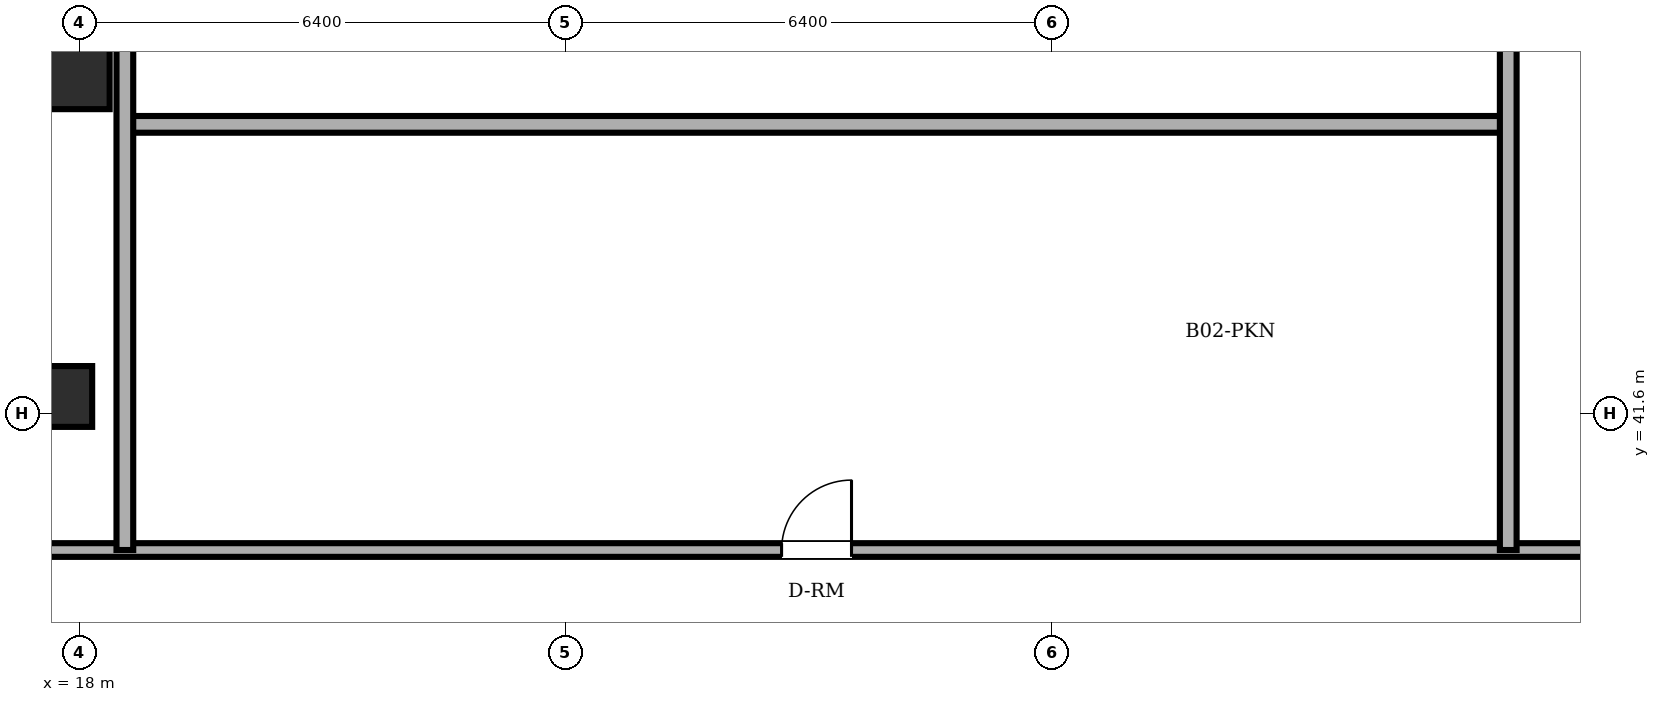
"""IFC4 building model, lengths in metres.
Left out: names, types, materials, properties, quantities, classifications, styles, units other than length and angle.
Written with IfcOpenShell. Run it as: python <this file> out.ifc"""

import sys

from ifc_helpers import new_model, si_unit, direction, frame, frame_2d, origin, origin_2d, place, context, subcontext, project, spatial, rectangle, extrude, element, fill, save


model = new_model("IFC4")
c1 = context("Model", 3, precision=1e-05, world=origin(), true_north=direction((0.0, 1.0)))
c2 = subcontext(c1, "Body", "Model", "MODEL_VIEW")
j1 = project(units=[si_unit("LENGTHUNIT", "METRE"), si_unit("PLANEANGLEUNIT", "RADIAN")], contexts=[c1])
p1 = place(None, origin())
s1 = spatial("IfcSite", under=j1, at=p1, CompositionType="ELEMENT")
p2 = place(p1, origin())
s2 = spatial("IfcBuilding", under=s1, at=p2, CompositionType="ELEMENT")
p3 = place(p2, frame((0.0, 0.0, -8.4)))
s3 = spatial("IfcBuildingStorey", under=s2, at=p3, CompositionType="ELEMENT", Elevation=-8.4)
for number, where, z_axis, x_axis in (
    (1, (18.0, 46.0, 0.0), (0.0, 0.0, 1.0), (1.0, 0.0, 0.0)),
    (2, (17.77, 41.82, 0.0), (0.0, 0.0, 1.0), (1.0, 0.0, 0.0)),
):
    element("IfcColumn", number, at=place(p3, frame(where, z_axis=z_axis, x_axis=x_axis)), inside=s3, PredefinedType="COLUMN", context=c2, shape_type="SweptSolid", body=[
        extrude(rectangle(XDim=0.8, YDim=0.8, at=origin_2d()), origin(), (0.0, 0.0, 1.0), 4.2),
    ])
p4 = place(p3, frame((8.5, 39.8, 0.0), z_axis=(0.0, 0.0, 1.0), x_axis=(1.0, 0.0, 0.0)))
e3 = element("IfcWall", 3, at=p4, inside=s3, PredefinedType="PARTITIONING", context=c2, shape_type="SweptSolid", body=[
    extrude(rectangle(XDim=49.9, YDim=0.18, at=frame_2d((24.95, 0.0))), origin(), (0.0, 0.0, 1.0), 3.95),
])
p5 = place(p4, frame((18.74, 0.0, 0.0)))
e4 = element("IfcOpeningElement", 4, at=p5, cuts=e3, PredefinedType="OPENING", context=c2, shape_type="SweptSolid", body=[
    extrude(rectangle(XDim=0.92, YDim=2.1, at=frame_2d((0.46, 1.05))), frame((0.0, 0.1, 0.0), z_axis=(0.0, -1.0, 0.0), x_axis=(1.0, 0.0, 0.0)), (0.0, 0.0, 1.0), 0.2),
])
p6 = place(p3, frame((18.6, 45.4, 0.0), z_axis=(0.0, 0.0, 1.0), x_axis=(1.0, 0.0, 0.0)))
e5 = element("IfcWall", 5, at=p6, inside=s3, PredefinedType="PARTITIONING", context=c2, shape_type="SweptSolid", body=[
    extrude(rectangle(XDim=18.2, YDim=0.22, at=frame_2d((9.1, 0.0))), origin(), (0.0, 0.0, 1.0), 3.95),
])
p7 = place(p3, frame((18.6, 39.8, 0.0), z_axis=(0.0, 0.0, 1.0), x_axis=(0.0, 1.0, 0.0)))
e6 = element("IfcWall", 6, at=p7, inside=s3, PredefinedType="PARTITIONING", context=c2, shape_type="SweptSolid", body=[
    extrude(rectangle(XDim=8.2, YDim=0.22, at=frame_2d((4.1, 0.0))), origin(), (0.0, 0.0, 1.0), 2.732),
])
p8 = place(p3, frame((36.8, 39.8, 0.0), z_axis=(0.0, 0.0, 1.0), x_axis=(0.0, 1.0, 0.0)))
e7 = element("IfcWall", 7, at=p8, inside=s3, PredefinedType="PARTITIONING", context=c2, shape_type="SweptSolid", body=[
    extrude(rectangle(XDim=8.2, YDim=0.22, at=frame_2d((4.1, 0.0))), origin(), (0.0, 0.0, 1.0), 3.95),
])
p9 = place(p5, origin())
e8 = element("IfcDoor", 8, at=p9, inside=s3, OperationType="SINGLE_SWING_RIGHT", PredefinedType="DOOR", context=c2, shape_type="SweptSolid", body=[
    extrude(rectangle(XDim=0.92, YDim=2.1, at=frame_2d((0.46, 1.05))), frame((0.0, 0.025, 0.0), z_axis=(0.0, -1.0, 0.0), x_axis=(1.0, 0.0, 0.0)), (0.0, 0.0, 1.0), 0.05),
])
fill(e4, e8)
save(model, sys.argv[1])
